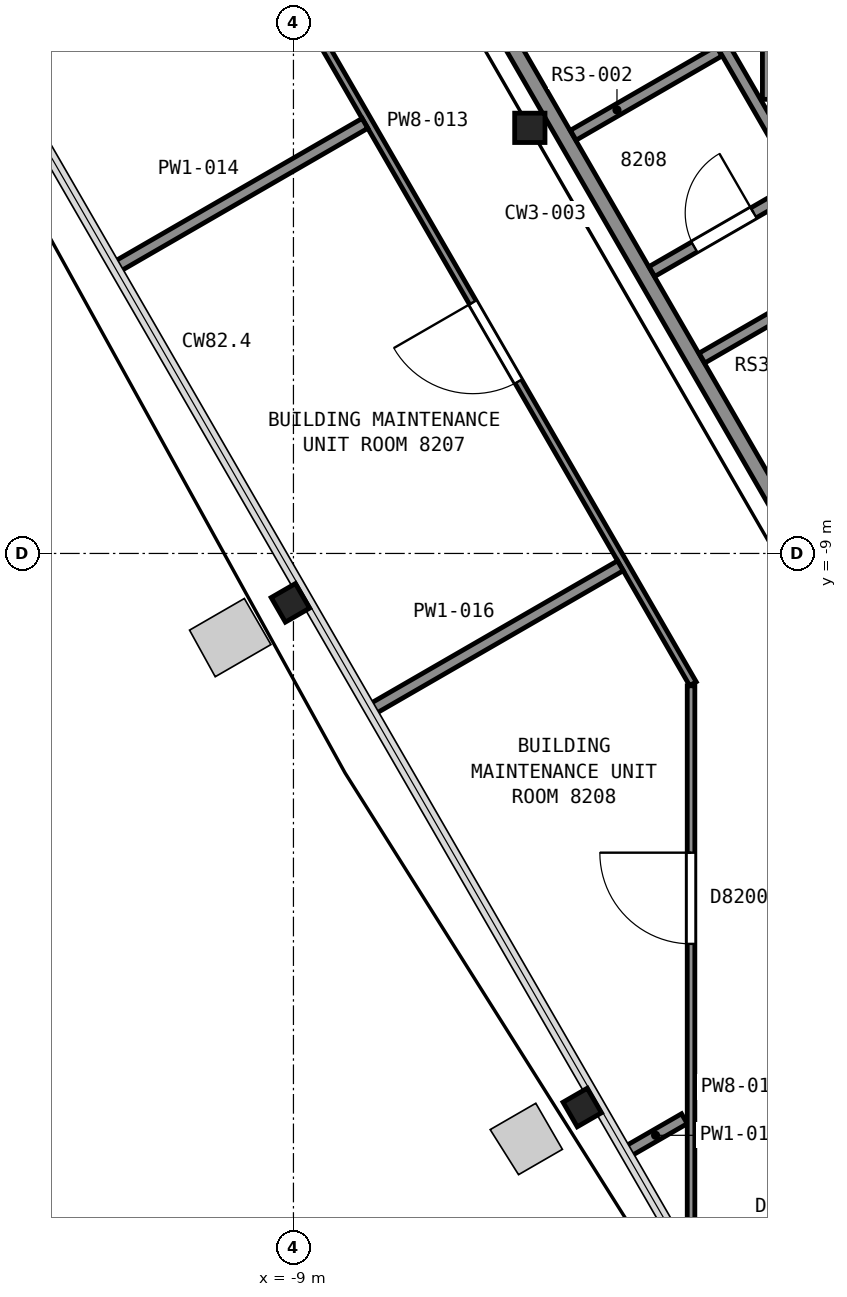
"""IFC4 building model, lengths in metres.
Left out: names, types, materials, properties, quantities, classifications, styles, units other than length and angle.
Written with IfcOpenShell. Run it as: python <this file> out.ifc"""

import sys

from ifc_helpers import new_model, si_unit, direction, frame, frame_2d, origin, origin_2d, place, context, subcontext, project, spatial, rectangle, i_section, extrude, element, fill, save


model = new_model("IFC4")
c1 = context("Model", 3, precision=1e-05, world=origin(), true_north=direction((0.0, 1.0)))
c2 = subcontext(c1, "Body", "Model", "MODEL_VIEW")
j1 = project(units=[si_unit("LENGTHUNIT", "METRE"), si_unit("PLANEANGLEUNIT", "RADIAN")], contexts=[c1])
p1 = place(None, origin())
s1 = spatial("IfcSite", under=j1, at=p1, CompositionType="ELEMENT")
p2 = place(p1, origin())
s2 = spatial("IfcBuilding", under=s1, at=p2, CompositionType="ELEMENT")
p3 = place(p2, frame((0.0, 0.0, 325.2)))
s3 = spatial("IfcBuildingStorey", under=s2, at=p3, CompositionType="ELEMENT", Elevation=325.2)
for number, where, z_axis, x_axis in (
    (1, (-9.04, -9.65, 0.0), (0.0, 0.0, 1.0), (-0.5, 0.866, 0.0)),
    (2, (-5.2, -16.29, 0.0), (0.0, 0.0, 1.0), (-0.5, 0.866, 0.0)),
):
    element("IfcColumn", number, at=place(p3, frame(where, z_axis=z_axis, x_axis=x_axis)), inside=s3, PredefinedType="COLUMN", context=c2, shape_type="SweptSolid", body=[
        extrude(i_section(OverallWidth=0.373, OverallDepth=0.368, WebThickness=0.015, FlangeThickness=0.024, FilletRadius=0.015, at=origin_2d()), origin(), (0.0, 0.0, 1.0), 4.2),
    ])
p4 = place(p3, frame((-5.89, -3.4, 0.0), z_axis=(0.0, 0.0, 1.0), x_axis=(1.0, 0.0, 0.0)))
e3 = element("IfcColumn", 3, at=p4, inside=s3, PredefinedType="COLUMN", context=c2, shape_type="SweptSolid", body=[
    extrude(i_section(OverallWidth=0.399, OverallDepth=0.386, WebThickness=0.021, FlangeThickness=0.033, FilletRadius=0.015, at=origin_2d()), origin(), (0.0, 0.0, 1.0), 4.2),
])
p5 = place(p3, frame((-7.141, -0.551, 0.0), z_axis=(0.0, 0.0, 1.0), x_axis=(0.499992795234, -0.866029563418, 0.0)))
e4 = element("IfcWall", 4, at=p5, inside=s3, PredefinedType="PARTITIONING", context=c2, shape_type="SweptSolid", body=[
    extrude(rectangle(XDim=9.198, YDim=0.2, at=frame_2d((4.599, 0.0))), origin(), (0.0, 0.0, 1.0), 3.95),
])
p6 = place(p3, frame((-5.319, -3.498, 0.0), z_axis=(0.0, 0.0, 1.0), x_axis=(0.866044287926, 0.499967290281, 0.0)))
e5 = element("IfcWall", 5, at=p6, inside=s3, PredefinedType="PARTITIONING", context=c2, shape_type="SweptSolid", body=[
    extrude(rectangle(XDim=2.216, YDim=0.15, at=frame_2d((1.108, 0.0))), origin(), (0.0, 0.0, 1.0), 3.95),
])
p7 = place(p3, frame((-2.259, -4.208, 0.0), z_axis=(0.0, 0.0, 1.0), x_axis=(-0.49996417568, 0.866046085977, 0.0)))
e6 = element("IfcWall", 6, at=p7, inside=s3, PredefinedType="PARTITIONING", context=c2, shape_type="SweptSolid", body=[
    extrude(rectangle(XDim=4.75, YDim=0.15, at=frame_2d((2.375, 0.0))), origin(), (0.0, 0.0, 1.0), 3.95),
])
p8 = place(p7, frame((2.975, 0.0, 0.0)))
e7 = element("IfcOpeningElement", 7, at=p8, cuts=e6, PredefinedType="OPENING", context=c2, shape_type="SweptSolid", body=[
    extrude(rectangle(XDim=0.9, YDim=2.1, at=frame_2d((0.45, 1.05))), frame((0.0, 0.085, 0.0), z_axis=(0.0, -1.0, 0.0), x_axis=(1.0, 0.0, 0.0)), (0.0, 0.0, 1.0), 0.17),
])
p9 = place(p3, frame((-4.284, -5.291, 0.0), z_axis=(0.0, 0.0, 1.0), x_axis=(0.866090396616, 0.499887412213, 0.0)))
e8 = element("IfcWall", 8, at=p9, inside=s3, PredefinedType="PARTITIONING", context=c2, shape_type="SweptSolid", body=[
    extrude(rectangle(XDim=2.221, YDim=0.15, at=frame_2d((1.11, 0.0))), origin(), (0.0, 0.0, 1.0), 3.95),
])
p10 = place(p9, frame((0.645, 0.0, 0.0)))
e9 = element("IfcOpeningElement", 9, at=p10, cuts=e8, PredefinedType="OPENING", context=c2, shape_type="SweptSolid", body=[
    extrude(rectangle(XDim=0.9, YDim=2.1, at=frame_2d((0.45, 1.05))), frame((0.0, 0.085, 0.0), z_axis=(0.0, -1.0, 0.0), x_axis=(1.0, 0.0, 0.0)), (0.0, 0.0, 1.0), 0.17),
])
p11 = place(p3, frame((-0.101, -4.395, 0.0), z_axis=(0.0, 0.0, 1.0), x_axis=(-0.866045745349, -0.499964765721, 0.0)))
e10 = element("IfcWall", 10, at=p11, inside=s3, PredefinedType="PARTITIONING", context=c2, shape_type="SweptSolid", body=[
    extrude(rectangle(XDim=4.07, YDim=0.15, at=frame_2d((2.035, 0.0))), origin(), (0.0, 0.0, 1.0), 3.95),
])
p12 = place(p11, frame((1.575, 0.0, 0.0)))
e11 = element("IfcOpeningElement", 11, at=p12, cuts=e10, PredefinedType="OPENING", context=c2, shape_type="SweptSolid", body=[
    extrude(rectangle(XDim=0.9, YDim=2.1, at=frame_2d((0.45, 1.05))), frame((0.0, 0.085, 0.0), z_axis=(0.0, -1.0, 0.0), x_axis=(1.0, 0.0, 0.0)), (0.0, 0.0, 1.0), 0.17),
])
p13 = place(p3, frame((-2.755, -0.102, 0.0), z_axis=(0.0, 0.0, 1.0), x_axis=(0.0, -1.0, 0.0)))
e12 = element("IfcWall", 12, at=p13, inside=s3, PredefinedType="PARTITIONING", context=c2, shape_type="SweptSolid", body=[
    extrude(rectangle(XDim=2.923, YDim=0.15, at=frame_2d((1.461, 0.0))), origin(), (0.0, 0.0, 1.0), 3.95),
])
p14 = place(p13, frame((0.598, 0.0, 0.0)))
e13 = element("IfcOpeningElement", 13, at=p14, cuts=e12, PredefinedType="OPENING", context=c2, shape_type="SweptSolid", body=[
    extrude(rectangle(XDim=0.9, YDim=2.1, at=frame_2d((0.45, 1.05))), frame((0.0, 0.085, 0.0), z_axis=(0.0, -1.0, 0.0), x_axis=(1.0, 0.0, 0.0)), (0.0, 0.0, 1.0), 0.17),
])
p15 = place(p3, frame((-3.744, -10.714, 0.0), z_axis=(0.0, 0.0, 1.0), x_axis=(-0.500044034969, 0.86599997869, 0.0)))
e14 = element("IfcWall", 14, at=p15, inside=s3, PredefinedType="PARTITIONING", context=c2, shape_type="SweptSolid", body=[
    extrude(rectangle(XDim=15.553, YDim=0.1, at=frame_2d((7.776, 0.0))), origin(), (0.0, 0.0, 1.0), 3.297),
])
p16 = place(p15, frame((11.314, 0.0, 0.0)))
e15 = element("IfcOpeningElement", 15, at=p16, cuts=e14, PredefinedType="OPENING", context=c2, shape_type="SweptSolid", body=[
    extrude(rectangle(XDim=1.2, YDim=2.1, at=frame_2d((0.6, 1.05))), frame((0.0, 0.06, 0.0), z_axis=(0.0, -1.0, 0.0), x_axis=(1.0, 0.0, 0.0)), (0.0, 0.0, 1.0), 0.12),
])
p17 = place(p15, frame((4.593, 0.0, 0.0)))
e16 = element("IfcOpeningElement", 16, at=p17, cuts=e14, PredefinedType="OPENING", context=c2, shape_type="SweptSolid", body=[
    extrude(rectangle(XDim=1.2, YDim=2.1, at=frame_2d((0.6, 1.05))), frame((0.0, 0.06, 0.0), z_axis=(0.0, -1.0, 0.0), x_axis=(1.0, 0.0, 0.0)), (0.0, 0.0, 1.0), 0.12),
])
p18 = place(p3, frame((-11.335, -5.233, 0.0), z_axis=(0.0, 0.0, 1.0), x_axis=(0.865922223361, 0.500178671167, 0.0)))
e17 = element("IfcWall", 17, at=p18, inside=s3, PredefinedType="PARTITIONING", context=c2, shape_type="SweptSolid", body=[
    extrude(rectangle(XDim=3.783, YDim=0.15, at=frame_2d((1.891, 0.0))), origin(), (0.0, 0.0, 1.0), 3.297),
])
p19 = place(p3, frame((-7.975, -11.054, 0.0), z_axis=(0.0, 0.0, 1.0), x_axis=(0.865998594852, 0.500046431558, 0.0)))
e18 = element("IfcWall", 18, at=p19, inside=s3, PredefinedType="PARTITIONING", context=c2, shape_type="SweptSolid", body=[
    extrude(rectangle(XDim=3.783, YDim=0.15, at=frame_2d((1.892, 0.0))), origin(), (0.0, 0.0, 1.0), 3.297),
])
p20 = place(p3, frame((-4.614, -16.874, 0.0), z_axis=(0.0, 0.0, 1.0), x_axis=(0.866399263961, 0.499351895369, 0.0)))
e19 = element("IfcWall", 19, at=p20, inside=s3, PredefinedType="PARTITIONING", context=c2, shape_type="SweptSolid", body=[
    extrude(rectangle(XDim=0.875, YDim=0.15, at=frame_2d((0.438, 0.0))), origin(), (0.0, 0.0, 1.0), 3.297),
])
p21 = place(p3, frame((-3.769, -18.253, 0.0), z_axis=(0.0, 0.0, 1.0), x_axis=(0.0, 1.0, 0.0)))
e20 = element("IfcWall", 20, at=p21, inside=s3, PredefinedType="PARTITIONING", context=c2, shape_type="SweptSolid", body=[
    extrude(rectangle(XDim=7.512, YDim=0.1, at=frame_2d((3.756, 0.0))), origin(), (0.0, 0.0, 1.0), 3.297),
])
p22 = place(p21, frame((4.116, 0.0, 0.0)))
e21 = element("IfcOpeningElement", 21, at=p22, cuts=e20, PredefinedType="OPENING", context=c2, shape_type="SweptSolid", body=[
    extrude(rectangle(XDim=1.2, YDim=2.1, at=frame_2d((0.6, 1.05))), frame((0.0, 0.06, 0.0), z_axis=(0.0, -1.0, 0.0), x_axis=(1.0, 0.0, 0.0)), (0.0, 0.0, 1.0), 0.12),
])
p23 = place(p10, origin())
e22 = element("IfcDoor", 22, at=p23, inside=s3, OperationType="SINGLE_SWING_RIGHT", PredefinedType="DOOR", context=c2, shape_type="SweptSolid", body=[
    extrude(rectangle(XDim=0.9, YDim=2.1, at=frame_2d((0.45, 1.05))), frame((0.0, 0.025, 0.0), z_axis=(0.0, -1.0, 0.0), x_axis=(1.0, 0.0, 0.0)), (0.0, 0.0, 1.0), 0.05),
])
fill(e9, e22)
p24 = place(p17, origin())
e23 = element("IfcDoor", 23, at=p24, inside=s3, OperationType="SINGLE_SWING_RIGHT", PredefinedType="DOOR", context=c2, shape_type="SweptSolid", body=[
    extrude(rectangle(XDim=1.2, YDim=2.1, at=frame_2d((0.6, 1.05))), frame((0.0, 0.025, 0.0), z_axis=(0.0, -1.0, 0.0), x_axis=(1.0, 0.0, 0.0)), (0.0, 0.0, 1.0), 0.05),
])
fill(e16, e23)
p25 = place(p22, origin())
e24 = element("IfcDoor", 24, at=p25, inside=s3, OperationType="SINGLE_SWING_RIGHT", PredefinedType="DOOR", context=c2, shape_type="SweptSolid", body=[
    extrude(rectangle(XDim=1.2, YDim=2.1, at=frame_2d((0.6, 1.05))), frame((0.0, 0.025, 0.0), z_axis=(0.0, -1.0, 0.0), x_axis=(1.0, 0.0, 0.0)), (0.0, 0.0, 1.0), 0.05),
])
fill(e21, e24)
save(model, sys.argv[1])
